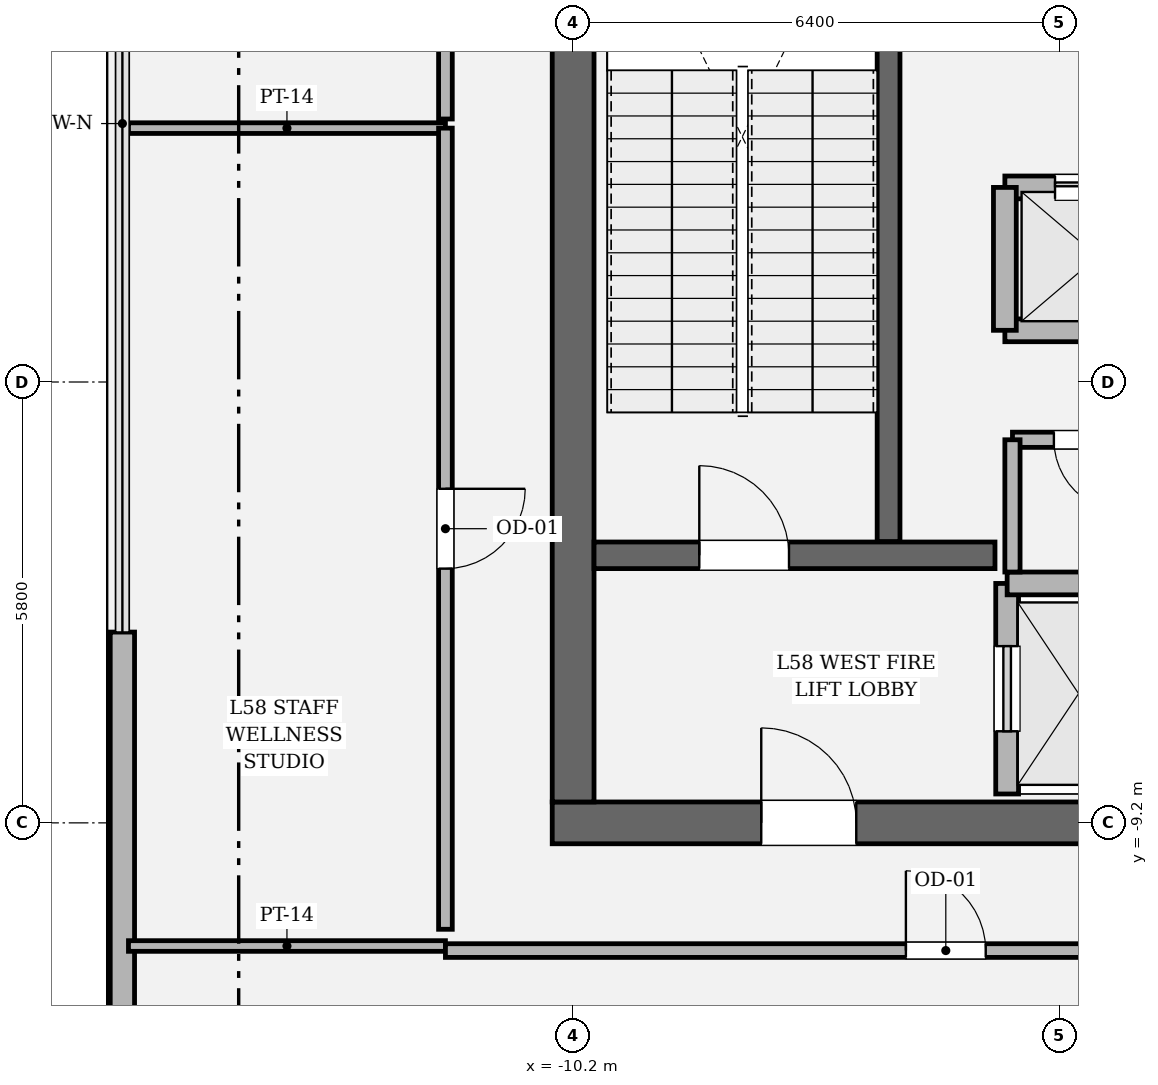
"""IFC4 building model, lengths in metres.
Left out: names, types, materials, properties, quantities, classifications, styles, units other than length and angle.
Written with IfcOpenShell. Run it as: python <this file> out.ifc"""

import sys

from ifc_helpers import new_model, si_unit, direction, frame, frame_2d, origin, place, context, subcontext, project, spatial, rectangle, extrude, element, fill, save


model = new_model("IFC4")
c1 = context("Model", 3, precision=1e-05, world=origin(), true_north=direction((0.0, 1.0)))
c2 = subcontext(c1, "Body", "Model", "MODEL_VIEW")
j1 = project(units=[si_unit("LENGTHUNIT", "METRE"), si_unit("PLANEANGLEUNIT", "RADIAN")], contexts=[c1])
p1 = place(None, origin())
s1 = spatial("IfcSite", under=j1, at=p1, CompositionType="ELEMENT")
p2 = place(p1, origin())
s2 = spatial("IfcBuilding", under=s1, at=p2, CompositionType="ELEMENT")
p3 = place(p2, frame((0.0, 0.0, 246.6)))
s3 = spatial("IfcBuildingStorey", under=s2, at=p3, CompositionType="ELEMENT", Elevation=246.6)
p4 = place(p3, frame((10.475, -9.2, 0.0), z_axis=(0.0, 0.0, 1.0), x_axis=(-1.0, 0.0, 0.0)))
e1 = element("IfcWall", 1, at=p4, inside=s3, PredefinedType="SHEAR", context=c2, shape_type="SweptSolid", body=[
    extrude(rectangle(XDim=20.95, YDim=0.55, at=frame_2d((10.475, 0.0))), origin(), (0.0, 0.0, 1.0), 4.8),
])
p5 = place(p4, frame((2.75, 0.0, 0.0)))
e2 = element("IfcOpeningElement", 2, at=p5, cuts=e1, PredefinedType="OPENING", context=c2, shape_type="SweptSolid", body=[
    extrude(rectangle(XDim=1.25, YDim=2.25, at=frame_2d((0.625, 1.125))), frame((0.0, 0.285, 0.0), z_axis=(0.0, -1.0, 0.0), x_axis=(1.0, 0.0, 0.0)), (0.0, 0.0, 1.0), 0.57),
])
p6 = place(p4, frame((16.95, 0.0, 0.0)))
e3 = element("IfcOpeningElement", 3, at=p6, cuts=e1, PredefinedType="OPENING", context=c2, shape_type="SweptSolid", body=[
    extrude(rectangle(XDim=1.25, YDim=2.25, at=frame_2d((0.625, 1.125))), frame((0.0, 0.285, 0.0), z_axis=(0.0, -1.0, 0.0), x_axis=(1.0, 0.0, 0.0)), (0.0, 0.0, 1.0), 0.57),
])
p7 = place(p3, frame((-10.2, -8.925, 0.0), z_axis=(0.0, 0.0, 1.0), x_axis=(0.0, 1.0, 0.0)))
e4 = element("IfcWall", 4, at=p7, inside=s3, PredefinedType="SHEAR", context=c2, shape_type="SweptSolid", body=[
    extrude(rectangle(XDim=17.85, YDim=0.55, at=frame_2d((8.925, 0.0))), origin(), (0.0, 0.0, 1.0), 4.8),
])
p8 = place(p7, frame((12.715, 0.0, 0.0)))
e5 = element("IfcOpeningElement", 5, at=p8, cuts=e4, PredefinedType="OPENING", context=c2, shape_type="SweptSolid", body=[
    extrude(rectangle(XDim=1.18, YDim=2.2, at=frame_2d((0.59, 1.1))), frame((0.0, 0.285, 0.0), z_axis=(0.0, -1.0, 0.0), x_axis=(1.0, 0.0, 0.0)), (0.0, 0.0, 1.0), 0.57),
])
p9 = place(p3, frame((-6.05, -5.5, 0.0), z_axis=(0.0, 0.0, 1.0), x_axis=(0.0, 1.0, 0.0)))
e6 = element("IfcWall", 6, at=p9, inside=s3, PredefinedType="SOLIDWALL", context=c2, shape_type="SweptSolid", body=[
    extrude(rectangle(XDim=8.95, YDim=0.3, at=frame_2d((4.475, 0.0))), origin(), (0.0, 0.0, 1.0), 4.8),
])
p10 = place(p3, frame((-9.925, -5.68, 0.0), z_axis=(0.0, 0.0, 1.0), x_axis=(1.0, 0.0, 0.0)))
e7 = element("IfcWall", 7, at=p10, inside=s3, PredefinedType="SOLIDWALL", context=c2, shape_type="SweptSolid", body=[
    extrude(rectangle(XDim=5.275, YDim=0.35, at=frame_2d((2.638, 0.0))), origin(), (0.0, 0.0, 1.0), 4.8),
])
p11 = place(p10, frame((1.385, 0.0, 0.0)))
e8 = element("IfcOpeningElement", 8, at=p11, cuts=e7, PredefinedType="OPENING", context=c2, shape_type="SweptSolid", body=[
    extrude(rectangle(XDim=1.18, YDim=2.2, at=frame_2d((0.59, 1.1))), frame((0.0, 0.185, 0.0), z_axis=(0.0, -1.0, 0.0), x_axis=(1.0, 0.0, 0.0)), (0.0, 0.0, 1.0), 0.37),
])
p12 = place(p3, frame((-16.13, -6.69, 0.0), z_axis=(0.0, 0.0, 1.0), x_axis=(0.0, -1.0, 0.0)))
e9 = element("IfcWall", 9, at=p12, inside=s3, PredefinedType="SOLIDWALL", context=c2, shape_type="SweptSolid", body=[
    extrude(rectangle(XDim=7.037, YDim=0.32, at=frame_2d((3.519, 0.0))), origin(), (0.0, 0.0, 1.0), 3.194),
])
p13 = place(p3, frame((-4.49, -8.82, 0.0), z_axis=(0.0, 0.0, 1.0), x_axis=(0.0, 1.0, 0.0)))
e10 = element("IfcWall", 10, at=p13, inside=s3, PredefinedType="SOLIDWALL", context=c2, shape_type="SweptSolid", body=[
    extrude(rectangle(XDim=2.77, YDim=0.3, at=frame_2d((1.385, 0.0))), origin(), (0.0, 0.0, 1.0), 4.52),
])
p14 = place(p13, frame((0.825, 0.0, 0.0)))
e11 = element("IfcOpeningElement", 11, at=p14, cuts=e10, PredefinedType="OPENING", context=c2, shape_type="SweptSolid", body=[
    extrude(rectangle(XDim=1.12, YDim=2.25, at=frame_2d((0.56, 1.125))), frame((0.0, 0.16, 0.0), z_axis=(0.0, -1.0, 0.0), x_axis=(1.0, 0.0, 0.0)), (0.0, 0.0, 1.0), 0.32),
])
p15 = place(p3, frame((-4.49, -6.05, 0.0), z_axis=(0.0, 0.0, 1.0), x_axis=(1.0, 0.0, 0.0)))
e12 = element("IfcWall", 12, at=p15, inside=s3, PredefinedType="SOLIDWALL", context=c2, shape_type="SweptSolid", body=[
    extrude(rectangle(XDim=1.88, YDim=0.3, at=frame_2d((0.94, 0.0))), origin(), (0.0, 0.0, 1.0), 4.52),
])
p16 = place(p3, frame((-4.52, -0.84, 0.0), z_axis=(0.0, 0.0, 1.0), x_axis=(1.0, 0.0, 0.0)))
e13 = element("IfcWall", 13, at=p16, inside=s3, PredefinedType="SOLIDWALL", context=c2, shape_type="SweptSolid", body=[
    extrude(rectangle(XDim=6.84, YDim=0.3, at=frame_2d((3.42, 0.0))), origin(), (0.0, 0.0, 1.0), 4.52),
])
p17 = place(p16, frame((0.66, 0.0, 0.0)))
e14 = element("IfcOpeningElement", 14, at=p17, cuts=e13, PredefinedType="OPENING", context=c2, shape_type="SweptSolid", body=[
    extrude(rectangle(XDim=1.12, YDim=2.25, at=frame_2d((0.56, 1.125))), frame((0.0, 0.16, 0.0), z_axis=(0.0, -1.0, 0.0), x_axis=(1.0, 0.0, 0.0)), (0.0, 0.0, 1.0), 0.32),
])
p18 = place(p16, frame((2.86, 0.0, 0.0)))
e15 = element("IfcOpeningElement", 15, at=p18, cuts=e13, PredefinedType="OPENING", context=c2, shape_type="SweptSolid", body=[
    extrude(rectangle(XDim=1.12, YDim=2.25, at=frame_2d((0.56, 1.125))), frame((0.0, 0.16, 0.0), z_axis=(0.0, -1.0, 0.0), x_axis=(1.0, 0.0, 0.0)), (0.0, 0.0, 1.0), 0.32),
])
p19 = place(p16, frame((5.06, 0.0, 0.0)))
e16 = element("IfcOpeningElement", 16, at=p19, cuts=e13, PredefinedType="OPENING", context=c2, shape_type="SweptSolid", body=[
    extrude(rectangle(XDim=1.12, YDim=2.25, at=frame_2d((0.56, 1.125))), frame((0.0, 0.16, 0.0), z_axis=(0.0, -1.0, 0.0), x_axis=(1.0, 0.0, 0.0)), (0.0, 0.0, 1.0), 0.32),
])
p20 = place(p3, frame((-4.52, -2.72, 0.0), z_axis=(0.0, 0.0, 1.0), x_axis=(1.0, 0.0, 0.0)))
e17 = element("IfcWall", 17, at=p20, inside=s3, PredefinedType="SOLIDWALL", context=c2, shape_type="SweptSolid", body=[
    extrude(rectangle(XDim=6.84, YDim=0.3, at=frame_2d((3.42, 0.0))), origin(), (0.0, 0.0, 1.0), 4.52),
])
p21 = place(p3, frame((-4.52, -2.72, 0.0), z_axis=(0.0, 0.0, 1.0), x_axis=(0.0, 1.0, 0.0)))
e18 = element("IfcWall", 18, at=p21, inside=s3, PredefinedType="SOLIDWALL", context=c2, shape_type="SweptSolid", body=[
    extrude(rectangle(XDim=1.88, YDim=0.3, at=frame_2d((0.94, 0.0))), origin(), (0.0, 0.0, 1.0), 4.52),
])
p22 = place(p3, frame((-2.38, -4.16, 0.0), z_axis=(0.0, 0.0, 1.0), x_axis=(-1.0, 0.0, 0.0)))
e19 = element("IfcWall", 19, at=p22, inside=s3, PredefinedType="SOLIDWALL", context=c2, shape_type="SweptSolid", body=[
    extrude(rectangle(XDim=2.04, YDim=0.2, at=frame_2d((1.02, 0.0))), origin(), (0.0, 0.0, 1.0), 4.52),
])
p23 = place(p22, frame((0.545, 0.0, 0.0)))
e20 = element("IfcOpeningElement", 20, at=p23, cuts=e19, PredefinedType="OPENING", context=c2, shape_type="SweptSolid", body=[
    extrude(rectangle(XDim=0.95, YDim=2.15, at=frame_2d((0.475, 1.075))), frame((0.0, 0.11, 0.0), z_axis=(0.0, -1.0, 0.0), x_axis=(1.0, 0.0, 0.0)), (0.0, 0.0, 1.0), 0.22),
])
p24 = place(p3, frame((-4.42, -4.16, 0.0), z_axis=(0.0, 0.0, 1.0), x_axis=(0.0, -1.0, 0.0)))
e21 = element("IfcWall", 21, at=p24, inside=s3, PredefinedType="SOLIDWALL", context=c2, shape_type="SweptSolid", body=[
    extrude(rectangle(XDim=1.74, YDim=0.2, at=frame_2d((0.87, 0.0))), origin(), (0.0, 0.0, 1.0), 4.52),
])
p25 = place(p3, frame((-16.05, -10.82, 0.0), z_axis=(0.0, 0.0, 1.0), x_axis=(1.0, 0.0, 0.0)))
e22 = element("IfcWall", 22, at=p25, inside=s3, PredefinedType="PARTITIONING", context=c2, shape_type="SweptSolid", body=[
    extrude(rectangle(XDim=4.17, YDim=0.14, at=frame_2d((2.085, 0.0))), origin(), (0.0, 0.0, 1.0), 4.154),
])
p26 = place(p3, frame((-11.88, -10.88, 0.0), z_axis=(0.0, 0.0, 1.0), x_axis=(1.0, 0.0, 0.0)))
e23 = element("IfcWall", 23, at=p26, inside=s3, PredefinedType="PARTITIONING", context=c2, shape_type="SweptSolid", body=[
    extrude(rectangle(XDim=13.166, YDim=0.18, at=frame_2d((6.583, 0.0))), origin(), (0.0, 0.0, 1.0), 3.194),
])
p27 = place(p26, frame((6.058, 0.0, 0.0)))
e24 = element("IfcOpeningElement", 24, at=p27, cuts=e23, PredefinedType="OPENING", context=c2, shape_type="SweptSolid", body=[
    extrude(rectangle(XDim=1.05, YDim=2.2, at=frame_2d((0.525, 1.1))), frame((0.0, 0.1, 0.0), z_axis=(0.0, -1.0, 0.0), x_axis=(1.0, 0.0, 0.0)), (0.0, 0.0, 1.0), 0.2),
])
p28 = place(p3, frame((-16.05, -0.06, 0.0), z_axis=(0.0, 0.0, 1.0), x_axis=(1.0, 0.0, 0.0)))
e25 = element("IfcWall", 25, at=p28, inside=s3, PredefinedType="PARTITIONING", context=c2, shape_type="SweptSolid", body=[
    extrude(rectangle(XDim=4.17, YDim=0.14, at=frame_2d((2.085, 0.0))), origin(), (0.0, 0.0, 1.0), 4.52),
])
p29 = place(p3, frame((-11.88, -0.06, 0.0), z_axis=(0.0, 0.0, 1.0), x_axis=(0.0, -1.0, 0.0)))
e26 = element("IfcWall", 26, at=p29, inside=s3, PredefinedType="PARTITIONING", context=c2, shape_type="SweptSolid", body=[
    extrude(rectangle(XDim=10.54, YDim=0.18, at=frame_2d((5.27, 0.0))), origin(), (0.0, 0.0, 1.0), 3.194),
])
p30 = place(p29, frame((4.745, 0.0, 0.0)))
e27 = element("IfcOpeningElement", 27, at=p30, cuts=e26, PredefinedType="OPENING", context=c2, shape_type="SweptSolid", body=[
    extrude(rectangle(XDim=1.05, YDim=2.2, at=frame_2d((0.525, 1.1))), frame((0.0, 0.1, 0.0), z_axis=(0.0, -1.0, 0.0), x_axis=(1.0, 0.0, 0.0)), (0.0, 0.0, 1.0), 0.2),
])
p31 = place(p3, frame((-11.88, 10.6, 0.0), z_axis=(0.0, 0.0, 1.0), x_axis=(0.0, -1.0, 0.0)))
e28 = element("IfcWall", 28, at=p31, inside=s3, PredefinedType="PARTITIONING", context=c2, shape_type="SweptSolid", body=[
    extrude(rectangle(XDim=10.54, YDim=0.18, at=frame_2d((5.27, 0.0))), origin(), (0.0, 0.0, 1.0), 3.194),
])
p32 = place(p31, frame((4.745, 0.0, 0.0)))
e29 = element("IfcOpeningElement", 29, at=p32, cuts=e28, PredefinedType="OPENING", context=c2, shape_type="SweptSolid", body=[
    extrude(rectangle(XDim=1.05, YDim=2.2, at=frame_2d((0.525, 1.1))), frame((0.0, 0.1, 0.0), z_axis=(0.0, -1.0, 0.0), x_axis=(1.0, 0.0, 0.0)), (0.0, 0.0, 1.0), 0.2),
])
p33 = place(p11, origin())
e30 = element("IfcDoor", 30, at=p33, inside=s3, OperationType="SINGLE_SWING_LEFT", PredefinedType="DOOR", context=c2, shape_type="SweptSolid", body=[
    extrude(rectangle(XDim=1.18, YDim=2.2, at=frame_2d((0.59, 1.1))), frame((0.0, 0.025, 0.0), z_axis=(0.0, -1.0, 0.0), x_axis=(1.0, 0.0, 0.0)), (0.0, 0.0, 1.0), 0.05),
])
fill(e8, e30)
p34 = place(p6, origin())
e31 = element("IfcDoor", 31, at=p34, inside=s3, OperationType="SINGLE_SWING_RIGHT", PredefinedType="DOOR", context=c2, shape_type="SweptSolid", body=[
    extrude(rectangle(XDim=1.25, YDim=2.25, at=frame_2d((0.625, 1.125))), frame((0.0, 0.025, 0.0), z_axis=(0.0, -1.0, 0.0), x_axis=(1.0, 0.0, 0.0)), (0.0, 0.0, 1.0), 0.05),
])
fill(e3, e31)
p35 = place(p14, origin())
e32 = element("IfcDoor", 32, at=p35, inside=s3, OperationType="SLIDING_TO_LEFT", PredefinedType="DOOR", context=c2, shape_type="SweptSolid", body=[
    extrude(rectangle(XDim=1.12, YDim=2.25, at=frame_2d((0.56, 1.125))), frame((0.0, 0.025, 0.0), z_axis=(0.0, -1.0, 0.0), x_axis=(1.0, 0.0, 0.0)), (0.0, 0.0, 1.0), 0.05),
])
fill(e11, e32)
p36 = place(p17, origin())
e33 = element("IfcDoor", 33, at=p36, inside=s3, OperationType="DOUBLE_DOOR_SLIDING", PredefinedType="DOOR", context=c2, shape_type="SweptSolid", body=[
    extrude(rectangle(XDim=1.12, YDim=2.25, at=frame_2d((0.56, 1.125))), frame((0.0, 0.025, 0.0), z_axis=(0.0, -1.0, 0.0), x_axis=(1.0, 0.0, 0.0)), (0.0, 0.0, 1.0), 0.05),
])
fill(e14, e33)
p37 = place(p23, origin())
e34 = element("IfcDoor", 34, at=p37, inside=s3, OperationType="SINGLE_SWING_LEFT", PredefinedType="DOOR", context=c2, shape_type="SweptSolid", body=[
    extrude(rectangle(XDim=0.95, YDim=2.15, at=frame_2d((0.475, 1.075))), frame((0.0, 0.025, 0.0), z_axis=(0.0, -1.0, 0.0), x_axis=(1.0, 0.0, 0.0)), (0.0, 0.0, 1.0), 0.05),
])
fill(e20, e34)
p38 = place(p27, origin())
e35 = element("IfcDoor", 35, at=p38, inside=s3, OperationType="SINGLE_SWING_LEFT", PredefinedType="DOOR", context=c2, shape_type="SweptSolid", body=[
    extrude(rectangle(XDim=1.05, YDim=2.2, at=frame_2d((0.525, 1.1))), frame((0.0, 0.025, 0.0), z_axis=(0.0, -1.0, 0.0), x_axis=(1.0, 0.0, 0.0)), (0.0, 0.0, 1.0), 0.05),
])
fill(e24, e35)
p39 = place(p30, origin())
e36 = element("IfcDoor", 36, at=p39, inside=s3, OperationType="SINGLE_SWING_LEFT", PredefinedType="DOOR", context=c2, shape_type="SweptSolid", body=[
    extrude(rectangle(XDim=1.05, YDim=2.2, at=frame_2d((0.525, 1.1))), frame((0.0, 0.025, 0.0), z_axis=(0.0, -1.0, 0.0), x_axis=(1.0, 0.0, 0.0)), (0.0, 0.0, 1.0), 0.05),
])
fill(e27, e36)
save(model, sys.argv[1])
